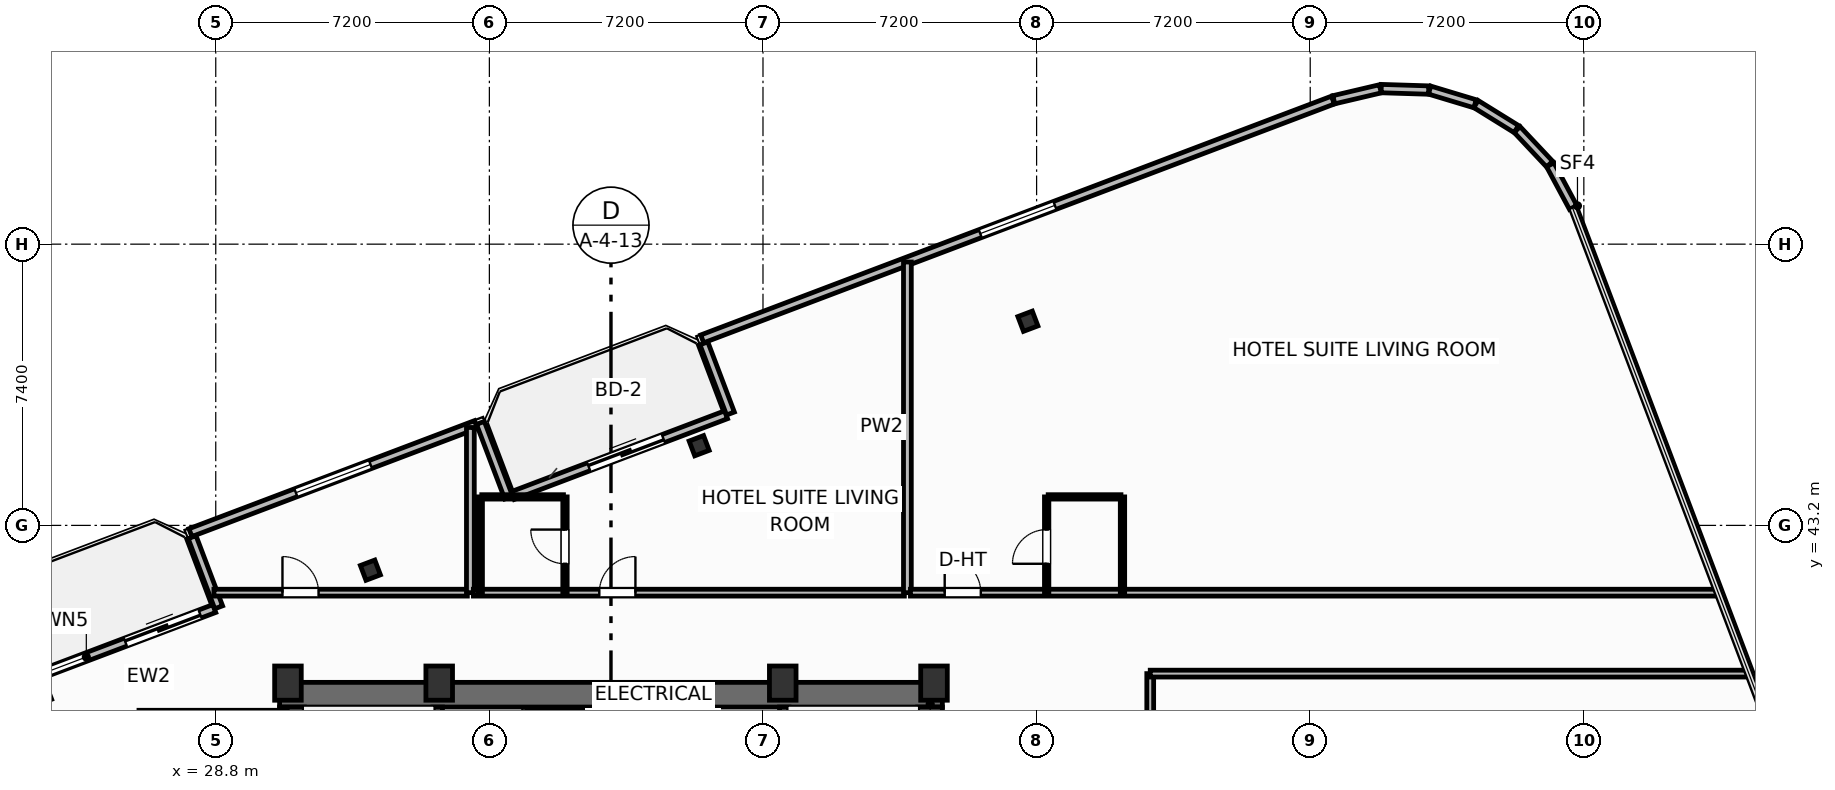
"""IFC4 building model, lengths in metres.
Left out: names, types, materials, properties, quantities, classifications, styles, units other than length and angle.
Written with IfcOpenShell. Run it as: python <this file> out.ifc"""

import sys

from ifc_helpers import new_model, si_unit, direction, frame, frame_2d, origin, origin_2d, place, context, subcontext, project, spatial, rectangle, i_section, extrude, element, fill, save


model = new_model("IFC4")
c1 = context("Model", 3, precision=1e-05, world=origin(), true_north=direction((0.0, 1.0)))
c2 = subcontext(c1, "Body", "Model", "MODEL_VIEW")
j1 = project(units=[si_unit("LENGTHUNIT", "METRE"), si_unit("PLANEANGLEUNIT", "RADIAN")], contexts=[c1])
p1 = place(None, origin())
s1 = spatial("IfcSite", under=j1, at=p1, CompositionType="ELEMENT")
p2 = place(p1, origin())
s2 = spatial("IfcBuilding", under=s1, at=p2, CompositionType="ELEMENT")
p3 = place(p2, frame((0.0, 0.0, 216.4)))
s3 = spatial("IfcBuildingStorey", under=s2, at=p3, CompositionType="ELEMENT", Elevation=216.4)
for number, where, z_axis, x_axis in (
    (1, (30.7, 39.05, 0.0), (0.0, 0.0, 1.0), (1.0, 0.0, 0.0)),
    (2, (34.68, 39.05, 0.0), (0.0, 0.0, 1.0), (1.0, 0.0, 0.0)),
    (3, (43.72, 39.05, 0.0), (0.0, 0.0, 1.0), (1.0, 0.0, 0.0)),
    (4, (47.7, 39.05, 0.0), (0.0, 0.0, 1.0), (1.0, 0.0, 0.0)),
):
    element("IfcColumn", number, at=place(p3, frame(where, z_axis=z_axis, x_axis=x_axis)), inside=s3, PredefinedType="COLUMN", context=c2, shape_type="SweptSolid", body=[
        extrude(rectangle(XDim=0.7, YDim=0.9, at=origin_2d()), origin(), (0.0, 0.0, 1.0), 3.7),
    ])
p4 = place(p3, frame((30.48, 38.745, 0.0), z_axis=(0.0, 0.0, 1.0), x_axis=(1.0, 0.0, 0.0)))
e5 = element("IfcWall", 5, at=p4, inside=s3, PredefinedType="SHEAR", context=c2, shape_type="SweptSolid", body=[
    extrude(rectangle(XDim=17.44, YDim=0.65, at=frame_2d((8.72, 0.0))), origin(), (0.0, 0.0, 1.0), 3.45),
])
for number, where, z_axis, x_axis in (
    (6, (30.805, 29.2, 0.0), (0.0, 0.0, 1.0), (0.0, 1.0, 0.0)),
    (7, (47.595, 29.2, 0.0), (0.0, 0.0, 1.0), (0.0, 1.0, 0.0)),
):
    element("IfcWall", number, at=place(p3, frame(where, z_axis=z_axis, x_axis=x_axis)), inside=s3, PredefinedType="SHEAR", context=c2, shape_type="SweptSolid", body=[
        extrude(rectangle(XDim=9.22, YDim=0.65, at=frame_2d((4.61, 0.0))), origin(), (0.0, 0.0, 1.0), 3.45),
    ])
p5 = place(p3, frame((34.64, 29.2, 0.0), z_axis=(0.0, 0.0, 1.0), x_axis=(0.0, 1.0, 0.0)))
e8 = element("IfcWall", 8, at=p5, inside=s3, PredefinedType="SHEAR", context=c2, shape_type="SweptSolid", body=[
    extrude(rectangle(XDim=9.22, YDim=0.25, at=frame_2d((4.61, 0.0))), origin(), (0.0, 0.0, 1.0), 3.45),
])
p6 = place(p5, frame((0.65, 0.0, 0.0)))
e9 = element("IfcOpeningElement", 9, at=p6, cuts=e8, PredefinedType="OPENING", context=c2, shape_type="SweptSolid", body=[
    extrude(rectangle(XDim=1.05, YDim=2.15, at=frame_2d((0.525, 1.075))), frame((0.0, 0.135, 0.0), z_axis=(0.0, -1.0, 0.0), x_axis=(1.0, 0.0, 0.0)), (0.0, 0.0, 1.0), 0.27),
])
p7 = place(p3, frame((43.76, 29.2, 0.0), z_axis=(0.0, 0.0, 1.0), x_axis=(0.0, 1.0, 0.0)))
e10 = element("IfcWall", 10, at=p7, inside=s3, PredefinedType="SHEAR", context=c2, shape_type="SweptSolid", body=[
    extrude(rectangle(XDim=9.22, YDim=0.25, at=frame_2d((4.61, 0.0))), origin(), (0.0, 0.0, 1.0), 3.45),
])
p8 = place(p7, frame((0.65, 0.0, 0.0)))
e11 = element("IfcOpeningElement", 11, at=p8, cuts=e10, PredefinedType="OPENING", context=c2, shape_type="SweptSolid", body=[
    extrude(rectangle(XDim=1.05, YDim=2.15, at=frame_2d((0.525, 1.075))), frame((0.0, 0.135, 0.0), z_axis=(0.0, -1.0, 0.0), x_axis=(1.0, 0.0, 0.0)), (0.0, 0.0, 1.0), 0.27),
])
for number, where, z_axis, x_axis in (
    (12, (50.171, 48.572, 0.0), (0.0, 0.0, 1.0), (0.935, 0.354, 0.0)),
    (13, (41.52, 45.297, 0.0), (0.0, 0.0, 1.0), (0.935, 0.354, 0.0)),
    (14, (32.869, 42.022, 0.0), (0.0, 0.0, 1.0), (0.935, 0.354, 0.0)),
):
    element("IfcColumn", number, at=place(p3, frame(where, z_axis=z_axis, x_axis=x_axis)), inside=s3, PredefinedType="COLUMN", context=c2, shape_type="SweptSolid", body=[
        extrude(i_section(OverallWidth=0.406, OverallDepth=0.416, WebThickness=0.03, FlangeThickness=0.048, FilletRadius=0.025, at=origin_2d()), origin(), (0.0, 0.0, 1.0), 3.7),
    ])
p9 = place(p3, frame((23.149, 38.887, 0.0), z_axis=(0.0, 0.0, 1.0), x_axis=(0.9352192676, 0.354069091436, 0.0)))
e15 = element("IfcWall", 15, at=p9, inside=s3, PredefinedType="SOLIDWALL", context=c2, shape_type="SweptSolid", body=[
    extrude(rectangle(XDim=6.0, YDim=0.22, at=frame_2d((3.0, 0.0))), origin(), (0.0, 0.0, 1.0), 2.73),
])
p10 = place(p9, frame((3.5, 0.0, 0.0)))
e16 = element("IfcOpeningElement", 16, at=p10, cuts=e15, PredefinedType="OPENING", context=c2, shape_type="SweptSolid", body=[
    extrude(rectangle(XDim=2.1, YDim=2.3, at=frame_2d((1.05, 1.15))), frame((0.0, 0.12, 0.0), z_axis=(0.0, -1.0, 0.0), x_axis=(1.0, 0.0, 0.0)), (0.0, 0.0, 1.0), 0.24),
])
p11 = place(p9, frame((0.55, 0.0, 0.75)))
e17 = element("IfcOpeningElement", 17, at=p11, cuts=e15, PredefinedType="OPENING", context=c2, shape_type="SweptSolid", body=[
    extrude(rectangle(XDim=1.85, YDim=1.75, at=frame_2d((0.925, 0.875))), frame((0.0, 0.12, 0.0), z_axis=(0.0, -1.0, 0.0), x_axis=(1.0, 0.0, 0.0)), (0.0, 0.0, 1.0), 0.24),
])
p12 = place(p3, frame((36.617, 43.986, 0.0), z_axis=(0.0, 0.0, 1.0), x_axis=(0.935227640088, 0.354046976001, 0.0)))
e18 = element("IfcWall", 18, at=p12, inside=s3, PredefinedType="SOLIDWALL", context=c2, shape_type="SweptSolid", body=[
    extrude(rectangle(XDim=6.0, YDim=0.22, at=frame_2d((3.0, 0.0))), origin(), (0.0, 0.0, 1.0), 2.73),
])
p13 = place(p12, frame((2.136, 0.0, 0.0)))
e19 = element("IfcOpeningElement", 19, at=p13, cuts=e18, PredefinedType="OPENING", context=c2, shape_type="SweptSolid", body=[
    extrude(rectangle(XDim=2.1, YDim=2.3, at=frame_2d((1.05, 1.15))), frame((0.0, 0.12, 0.0), z_axis=(0.0, -1.0, 0.0), x_axis=(1.0, 0.0, 0.0)), (0.0, 0.0, 1.0), 0.24),
])
p14 = place(p3, frame((64.519, 51.566, 0.0), z_axis=(0.0, 0.0, 1.0), x_axis=(-0.473093575122, 0.881012184466, 0.0)))
e20 = element("IfcWall", 20, at=p14, inside=s3, PredefinedType="SOLIDWALL", context=c2, shape_type="SweptSolid", body=[
    extrude(rectangle(XDim=1.274, YDim=0.22, at=frame_2d((0.637, 0.0))), origin(), (0.0, 0.0, 1.0), 2.73),
])
for number, where, z_axis, x_axis in (
    (21, (63.899, 52.706, 0.0), (0.0, 0.0, 1.0), (-0.685, 0.729, 0.0)),
    (22, (63.023, 53.629, 0.0), (0.0, 0.0, 1.0), (-0.85, 0.526, 0.0)),
):
    element("IfcWall", number, at=place(p3, frame(where, z_axis=z_axis, x_axis=x_axis)), inside=s3, PredefinedType="SOLIDWALL", context=c2, shape_type="SweptSolid", body=[
        extrude(rectangle(XDim=1.249, YDim=0.22, at=frame_2d((0.625, 0.0))), origin(), (0.0, 0.0, 1.0), 2.73),
    ])
for number, where, z_axis, x_axis in (
    (23, (61.937, 54.294, 0.0), (0.0, 0.0, 1.0), (-0.958, 0.288, 0.0)),
    (24, (60.717, 54.655, 0.0), (0.0, 0.0, 1.0), (-1.0, 0.031, 0.0)),
):
    element("IfcWall", number, at=place(p3, frame(where, z_axis=z_axis, x_axis=x_axis)), inside=s3, PredefinedType="SOLIDWALL", context=c2, shape_type="SweptSolid", body=[
        extrude(rectangle(XDim=1.249, YDim=0.22, at=frame_2d((0.624, 0.0))), origin(), (0.0, 0.0, 1.0), 2.73),
    ])
p15 = place(p3, frame((59.444, 54.688, 0.0), z_axis=(0.0, 0.0, 1.0), x_axis=(-0.973409523464, -0.229071821989, 0.0)))
e25 = element("IfcWall", 25, at=p15, inside=s3, PredefinedType="SOLIDWALL", context=c2, shape_type="SweptSolid", body=[
    extrude(rectangle(XDim=1.257, YDim=0.22, at=frame_2d((0.628, 0.0))), origin(), (0.0, 0.0, 1.0), 2.73),
])
p16 = place(p3, frame((58.198, 54.391, 0.0), z_axis=(0.0, 0.0, 1.0), x_axis=(-0.935223849772, -0.354056988094, 0.0)))
e26 = element("IfcWall", 26, at=p16, inside=s3, PredefinedType="SOLIDWALL", context=c2, shape_type="SweptSolid", body=[
    extrude(rectangle(XDim=17.747, YDim=0.22, at=frame_2d((8.874, 0.0))), origin(), (0.0, 0.0, 1.0), 2.73),
])
p17 = place(p16, frame((7.823, 0.0, 0.8)))
e27 = element("IfcOpeningElement", 27, at=p17, cuts=e26, PredefinedType="OPENING", context=c2, shape_type="SweptSolid", body=[
    extrude(rectangle(XDim=2.1, YDim=1.75, at=frame_2d((1.05, 0.875))), frame((0.0, 0.12, 0.0), z_axis=(0.0, -1.0, 0.0), x_axis=(1.0, 0.0, 0.0)), (0.0, 0.0, 1.0), 0.24),
])
p18 = place(p3, frame((41.645, 47.99, 0.0), z_axis=(0.0, 0.0, 1.0), x_axis=(0.354020680661, -0.935237594232, 0.0)))
e28 = element("IfcWall", 28, at=p18, inside=s3, PredefinedType="SOLIDWALL", context=c2, shape_type="SweptSolid", body=[
    extrude(rectangle(XDim=1.975, YDim=0.22, at=frame_2d((0.988, 0.0))), origin(), (0.0, 0.0, 1.0), 2.73),
])
p19 = place(p3, frame((36.508, 43.934, 0.0), z_axis=(0.0, 0.0, 1.0), x_axis=(-0.354128469405, 0.935196785258, 0.0)))
e29 = element("IfcWall", 29, at=p19, inside=s3, PredefinedType="SOLIDWALL", context=c2, shape_type="SweptSolid", body=[
    extrude(rectangle(XDim=2.1, YDim=0.22, at=frame_2d((1.05, 0.0))), origin(), (0.0, 0.0, 1.0), 2.73),
])
p20 = place(p3, frame((35.648, 45.854, 0.0), z_axis=(0.0, 0.0, 1.0), x_axis=(-0.935230796934, -0.354038636968, 0.0)))
e30 = element("IfcWall", 30, at=p20, inside=s3, PredefinedType="SOLIDWALL", context=c2, shape_type="SweptSolid", body=[
    extrude(rectangle(XDim=8.035, YDim=0.22, at=frame_2d((4.018, 0.0))), origin(), (0.0, 0.0, 1.0), 2.73),
])
p21 = place(p20, frame((2.968, 0.0, 0.8)))
e31 = element("IfcOpeningElement", 31, at=p21, cuts=e30, PredefinedType="OPENING", context=c2, shape_type="SweptSolid", body=[
    extrude(rectangle(XDim=2.1, YDim=1.75, at=frame_2d((1.05, 0.875))), frame((0.0, 0.12, 0.0), z_axis=(0.0, -1.0, 0.0), x_axis=(1.0, 0.0, 0.0)), (0.0, 0.0, 1.0), 0.24),
])
p22 = place(p3, frame((28.177, 42.892, 0.0), z_axis=(0.0, 0.0, 1.0), x_axis=(0.354061611705, -0.935222099352, 0.0)))
e32 = element("IfcWall", 32, at=p22, inside=s3, PredefinedType="SOLIDWALL", context=c2, shape_type="SweptSolid", body=[
    extrude(rectangle(XDim=1.975, YDim=0.22, at=frame_2d((0.987, 0.0))), origin(), (0.0, 0.0, 1.0), 2.73),
])
p23 = place(p3, frame((28.752, 41.43, 0.0), z_axis=(0.0, 0.0, 1.0), x_axis=(1.0, 0.0, 0.0)))
e33 = element("IfcWall", 33, at=p23, inside=s3, PredefinedType="PARTITIONING", context=c2, shape_type="SweptSolid", body=[
    extrude(rectangle(XDim=6.668, YDim=0.18, at=frame_2d((3.334, 0.0))), origin(), (0.0, 0.0, 1.0), 3.45),
])
p24 = place(p23, frame((1.803, 0.0, 0.0)))
e34 = element("IfcOpeningElement", 34, at=p24, cuts=e33, PredefinedType="OPENING", context=c2, shape_type="SweptSolid", body=[
    extrude(rectangle(XDim=0.95, YDim=2.05, at=frame_2d((0.475, 1.025))), frame((0.0, 0.1, 0.0), z_axis=(0.0, -1.0, 0.0), x_axis=(1.0, 0.0, 0.0)), (0.0, 0.0, 1.0), 0.2),
])
p25 = place(p3, frame((35.5, 41.43, 0.0), z_axis=(0.0, 0.0, 1.0), x_axis=(0.0, 1.0, 0.0)))
e35 = element("IfcWall", 35, at=p25, inside=s3, PredefinedType="PARTITIONING", context=c2, shape_type="SweptSolid", body=[
    extrude(rectangle(XDim=4.346, YDim=0.205, at=frame_2d((2.173, 0.0))), origin(), (0.0, 0.0, 1.0), 3.45),
])
p26 = place(p3, frame((35.58, 41.43, 0.0), z_axis=(0.0, 0.0, 1.0), x_axis=(1.0, 0.0, 0.0)))
e36 = element("IfcWall", 36, at=p26, inside=s3, PredefinedType="PARTITIONING", context=c2, shape_type="SweptSolid", body=[
    extrude(rectangle(XDim=11.34, YDim=0.18, at=frame_2d((5.67, 0.0))), origin(), (0.0, 0.0, 1.0), 3.018),
])
p27 = place(p26, frame((3.313, 0.0, 0.0)))
e37 = element("IfcOpeningElement", 37, at=p27, cuts=e36, PredefinedType="OPENING", context=c2, shape_type="SweptSolid", body=[
    extrude(rectangle(XDim=0.95, YDim=2.15, at=frame_2d((0.475, 1.075))), frame((0.0, 0.1, 0.0), z_axis=(0.0, -1.0, 0.0), x_axis=(1.0, 0.0, 0.0)), (0.0, 0.0, 1.0), 0.2),
])
p28 = place(p3, frame((35.8, 43.95, 0.0), z_axis=(0.0, 0.0, 1.0), x_axis=(1.0, 0.0, 0.0)))
e38 = element("IfcWall", 38, at=p28, inside=s3, PredefinedType="PARTITIONING", context=c2, shape_type="SweptSolid", body=[
    extrude(rectangle(XDim=2.15, YDim=0.115, at=frame_2d((1.075, 0.0))), origin(), (0.0, 0.0, 1.0), 3.45),
])
p29 = place(p3, frame((37.99, 41.43, 0.0), z_axis=(0.0, 0.0, 1.0), x_axis=(0.0, 1.0, 0.0)))
e39 = element("IfcWall", 39, at=p29, inside=s3, PredefinedType="PARTITIONING", context=c2, shape_type="SweptSolid", body=[
    extrude(rectangle(XDim=2.52, YDim=0.115, at=frame_2d((1.26, 0.0))), origin(), (0.0, 0.0, 1.0), 3.45),
])
p30 = place(p29, frame((0.76, 0.0, 0.0)))
e40 = element("IfcOpeningElement", 40, at=p30, cuts=e39, PredefinedType="OPENING", context=c2, shape_type="SweptSolid", body=[
    extrude(rectangle(XDim=0.9, YDim=2.05, at=frame_2d((0.45, 1.025))), frame((0.0, 0.067, 0.0), z_axis=(0.0, -1.0, 0.0), x_axis=(1.0, 0.0, 0.0)), (0.0, 0.0, 1.0), 0.135),
])
p31 = place(p3, frame((35.76, 41.43, 0.0), z_axis=(0.0, 0.0, 1.0), x_axis=(0.0, 1.0, 0.0)))
e41 = element("IfcWall", 41, at=p31, inside=s3, PredefinedType="PARTITIONING", context=c2, shape_type="SweptSolid", body=[
    extrude(rectangle(XDim=2.52, YDim=0.115, at=frame_2d((1.26, 0.0))), origin(), (0.0, 0.0, 1.0), 3.45),
])
p32 = place(p3, frame((47.0, 41.43, 0.0), z_axis=(0.0, 0.0, 1.0), x_axis=(0.0, 1.0, 0.0)))
e42 = element("IfcWall", 42, at=p32, inside=s3, PredefinedType="PARTITIONING", context=c2, shape_type="SweptSolid", body=[
    extrude(rectangle(XDim=8.7, YDim=0.205, at=frame_2d((4.35, 0.0))), origin(), (0.0, 0.0, 1.0), 3.45),
])
p33 = place(p3, frame((47.08, 41.43, 0.0), z_axis=(0.0, 0.0, 1.0), x_axis=(1.0, 0.0, 0.0)))
e43 = element("IfcWall", 43, at=p33, inside=s3, PredefinedType="PARTITIONING", context=c2, shape_type="SweptSolid", body=[
    extrude(rectangle(XDim=21.216, YDim=0.18, at=frame_2d((10.608, 0.0))), origin(), (0.0, 0.0, 1.0), 3.45),
])
p34 = place(p33, frame((0.902, 0.0, 0.0)))
e44 = element("IfcOpeningElement", 44, at=p34, cuts=e43, PredefinedType="OPENING", context=c2, shape_type="SweptSolid", body=[
    extrude(rectangle(XDim=0.95, YDim=2.15, at=frame_2d((0.475, 1.075))), frame((0.0, 0.1, 0.0), z_axis=(0.0, -1.0, 0.0), x_axis=(1.0, 0.0, 0.0)), (0.0, 0.0, 1.0), 0.2),
])
p35 = place(p3, frame((50.705, 43.95, 0.0), z_axis=(0.0, 0.0, 1.0), x_axis=(1.0, 0.0, 0.0)))
e45 = element("IfcWall", 45, at=p35, inside=s3, PredefinedType="PARTITIONING", context=c2, shape_type="SweptSolid", body=[
    extrude(rectangle(XDim=1.915, YDim=0.115, at=frame_2d((0.958, 0.0))), origin(), (0.0, 0.0, 1.0), 3.45),
])
p36 = place(p3, frame((50.665, 41.43, 0.0), z_axis=(0.0, 0.0, 1.0), x_axis=(0.0, 1.0, 0.0)))
e46 = element("IfcWall", 46, at=p36, inside=s3, PredefinedType="PARTITIONING", context=c2, shape_type="SweptSolid", body=[
    extrude(rectangle(XDim=2.52, YDim=0.115, at=frame_2d((1.26, 0.0))), origin(), (0.0, 0.0, 1.0), 3.45),
])
p37 = place(p36, frame((0.76, 0.0, 0.0)))
e47 = element("IfcOpeningElement", 47, at=p37, cuts=e46, PredefinedType="OPENING", context=c2, shape_type="SweptSolid", body=[
    extrude(rectangle(XDim=0.9, YDim=2.05, at=frame_2d((0.45, 1.025))), frame((0.0, 0.067, 0.0), z_axis=(0.0, -1.0, 0.0), x_axis=(1.0, 0.0, 0.0)), (0.0, 0.0, 1.0), 0.135),
])
p38 = place(p3, frame((52.66, 41.43, 0.0), z_axis=(0.0, 0.0, 1.0), x_axis=(0.0, 1.0, 0.0)))
e48 = element("IfcWall", 48, at=p38, inside=s3, PredefinedType="PARTITIONING", context=c2, shape_type="SweptSolid", body=[
    extrude(rectangle(XDim=2.52, YDim=0.115, at=frame_2d((1.26, 0.0))), origin(), (0.0, 0.0, 1.0), 3.45),
])
p39 = place(p3, frame((53.39, 19.24, 0.0), z_axis=(0.0, 0.0, 1.0), x_axis=(0.0, 1.0, 0.0)))
e49 = element("IfcWall", 49, at=p39, inside=s3, PredefinedType="PARTITIONING", context=c2, shape_type="SweptSolid", body=[
    extrude(rectangle(XDim=20.06, YDim=0.18, at=frame_2d((10.03, 0.0))), origin(), (0.0, 0.0, 1.0), 3.45),
])
p40 = place(p39, frame((7.7, 0.0, 0.0)))
e50 = element("IfcOpeningElement", 50, at=p40, cuts=e49, PredefinedType="OPENING", context=c2, shape_type="SweptSolid", body=[
    extrude(rectangle(XDim=0.95, YDim=2.05, at=frame_2d((0.475, 1.025))), frame((0.0, 0.1, 0.0), z_axis=(0.0, -1.0, 0.0), x_axis=(1.0, 0.0, 0.0)), (0.0, 0.0, 1.0), 0.2),
])
p41 = place(p3, frame((53.39, 39.3, 0.0), z_axis=(0.0, 0.0, 1.0), x_axis=(1.0, 0.0, 0.0)))
e51 = element("IfcWall", 51, at=p41, inside=s3, PredefinedType="PARTITIONING", context=c2, shape_type="SweptSolid", body=[
    extrude(rectangle(XDim=15.713, YDim=0.18, at=frame_2d((7.856, 0.0))), origin(), (0.0, 0.0, 1.0), 3.45),
])
p42 = place(p10, origin())
e52 = element("IfcDoor", 52, at=p42, inside=s3, OperationType="SLIDING_TO_LEFT", PredefinedType="DOOR", context=c2, shape_type="SweptSolid", body=[
    extrude(rectangle(XDim=2.1, YDim=2.3, at=frame_2d((1.05, 1.15))), frame((0.0, 0.025, 0.0), z_axis=(0.0, -1.0, 0.0), x_axis=(1.0, 0.0, 0.0)), (0.0, 0.0, 1.0), 0.05),
])
fill(e16, e52)
p43 = place(p11, origin())
e53 = element("IfcWindow", 53, at=p43, inside=s3, PartitioningType="SINGLE_PANEL", PredefinedType="WINDOW", context=c2, shape_type="SweptSolid", body=[
    extrude(rectangle(XDim=1.85, YDim=1.75, at=frame_2d((0.925, 0.875))), frame((0.0, 0.03, 0.0), z_axis=(0.0, -1.0, 0.0), x_axis=(1.0, 0.0, 0.0)), (0.0, 0.0, 1.0), 0.06),
])
fill(e17, e53)
p44 = place(p13, origin())
e54 = element("IfcDoor", 54, at=p44, inside=s3, OperationType="SLIDING_TO_LEFT", PredefinedType="DOOR", context=c2, shape_type="SweptSolid", body=[
    extrude(rectangle(XDim=2.1, YDim=2.3, at=frame_2d((1.05, 1.15))), frame((0.0, 0.025, 0.0), z_axis=(0.0, -1.0, 0.0), x_axis=(1.0, 0.0, 0.0)), (0.0, 0.0, 1.0), 0.05),
])
fill(e19, e54)
p45 = place(p17, origin())
e55 = element("IfcWindow", 55, at=p45, inside=s3, PartitioningType="SINGLE_PANEL", PredefinedType="WINDOW", context=c2, shape_type="SweptSolid", body=[
    extrude(rectangle(XDim=2.1, YDim=1.75, at=frame_2d((1.05, 0.875))), frame((0.0, 0.03, 0.0), z_axis=(0.0, -1.0, 0.0), x_axis=(1.0, 0.0, 0.0)), (0.0, 0.0, 1.0), 0.06),
])
fill(e27, e55)
p46 = place(p21, origin())
e56 = element("IfcWindow", 56, at=p46, inside=s3, PartitioningType="SINGLE_PANEL", PredefinedType="WINDOW", context=c2, shape_type="SweptSolid", body=[
    extrude(rectangle(XDim=2.1, YDim=1.75, at=frame_2d((1.05, 0.875))), frame((0.0, 0.03, 0.0), z_axis=(0.0, -1.0, 0.0), x_axis=(1.0, 0.0, 0.0)), (0.0, 0.0, 1.0), 0.06),
])
fill(e31, e56)
p47 = place(p24, origin())
e57 = element("IfcDoor", 57, at=p47, inside=s3, OperationType="SINGLE_SWING_LEFT", PredefinedType="DOOR", context=c2, shape_type="SweptSolid", body=[
    extrude(rectangle(XDim=0.95, YDim=2.05, at=frame_2d((0.475, 1.025))), frame((0.0, 0.025, 0.0), z_axis=(0.0, -1.0, 0.0), x_axis=(1.0, 0.0, 0.0)), (0.0, 0.0, 1.0), 0.05),
])
fill(e34, e57)
p48 = place(p27, origin())
e58 = element("IfcDoor", 58, at=p48, inside=s3, OperationType="SINGLE_SWING_RIGHT", PredefinedType="DOOR", context=c2, shape_type="SweptSolid", body=[
    extrude(rectangle(XDim=0.95, YDim=2.15, at=frame_2d((0.475, 1.075))), frame((0.0, 0.025, 0.0), z_axis=(0.0, -1.0, 0.0), x_axis=(1.0, 0.0, 0.0)), (0.0, 0.0, 1.0), 0.05),
])
fill(e37, e58)
p49 = place(p30, origin())
e59 = element("IfcDoor", 59, at=p49, inside=s3, OperationType="SINGLE_SWING_RIGHT", PredefinedType="DOOR", context=c2, shape_type="SweptSolid", body=[
    extrude(rectangle(XDim=0.9, YDim=2.05, at=frame_2d((0.45, 1.025))), frame((0.0, 0.025, 0.0), z_axis=(0.0, -1.0, 0.0), x_axis=(1.0, 0.0, 0.0)), (0.0, 0.0, 1.0), 0.05),
])
fill(e40, e59)
p50 = place(p34, origin())
e60 = element("IfcDoor", 60, at=p50, inside=s3, OperationType="SINGLE_SWING_LEFT", PredefinedType="DOOR", context=c2, shape_type="SweptSolid", body=[
    extrude(rectangle(XDim=0.95, YDim=2.15, at=frame_2d((0.475, 1.075))), frame((0.0, 0.025, 0.0), z_axis=(0.0, -1.0, 0.0), x_axis=(1.0, 0.0, 0.0)), (0.0, 0.0, 1.0), 0.05),
])
fill(e44, e60)
p51 = place(p37, origin())
e61 = element("IfcDoor", 61, at=p51, inside=s3, OperationType="SINGLE_SWING_LEFT", PredefinedType="DOOR", context=c2, shape_type="SweptSolid", body=[
    extrude(rectangle(XDim=0.9, YDim=2.05, at=frame_2d((0.45, 1.025))), frame((0.0, 0.025, 0.0), z_axis=(0.0, -1.0, 0.0), x_axis=(1.0, 0.0, 0.0)), (0.0, 0.0, 1.0), 0.05),
])
fill(e47, e61)
save(model, sys.argv[1])
